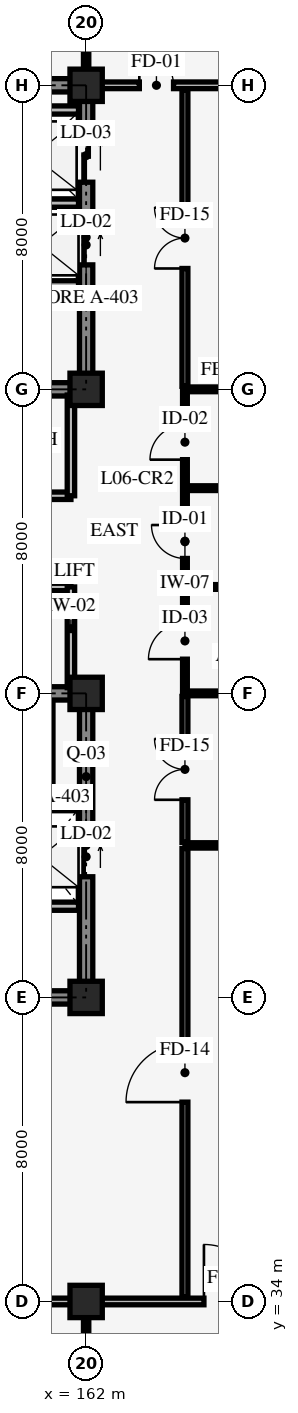
"""IFC4 building model, lengths in metres.
Left out: names, types, materials, properties, quantities, classifications, styles, units other than length and angle.
Written with IfcOpenShell. Run it as: python <this file> out.ifc"""

import sys

from ifc_helpers import new_model, si_unit, direction, frame, frame_2d, origin, origin_2d, place, context, subcontext, project, spatial, rectangle, extrude, element, fill, save


model = new_model("IFC4")
c1 = context("Model", 3, precision=1e-05, world=origin(), true_north=direction((0.0, 1.0)))
c2 = subcontext(c1, "Body", "Model", "MODEL_VIEW")
j1 = project(units=[si_unit("LENGTHUNIT", "METRE"), si_unit("PLANEANGLEUNIT", "RADIAN")], contexts=[c1])
p1 = place(None, origin())
s1 = spatial("IfcSite", under=j1, at=p1, CompositionType="ELEMENT")
p2 = place(p1, origin())
s2 = spatial("IfcBuilding", under=s1, at=p2, CompositionType="ELEMENT")
p3 = place(p2, frame((0.0, 0.0, 23.4)))
s3 = spatial("IfcBuildingStorey", under=s2, at=p3, CompositionType="ELEMENT", Elevation=23.4)
p4 = place(p3, frame((154.0, 42.0, 0.0), z_axis=(0.0, 0.0, 1.0), x_axis=(1.0, 0.0, 0.0)))
e1 = element("IfcWall", 1, at=p4, inside=s3, PredefinedType="SHEAR", context=c2, shape_type="SweptSolid", body=[
    extrude(rectangle(XDim=8.0, YDim=0.35, at=frame_2d((4.0, 0.0))), origin(), (0.0, 0.0, 1.0), 3.95),
])
p5 = place(p3, frame((162.0, 42.0, 0.0), z_axis=(0.0, 0.0, 1.0), x_axis=(0.0, 1.0, 0.0)))
e2 = element("IfcWall", 2, at=p5, inside=s3, PredefinedType="SHEAR", context=c2, shape_type="SweptSolid", body=[
    extrude(rectangle(XDim=8.0, YDim=0.35, at=frame_2d((4.0, 0.0))), origin(), (0.0, 0.0, 1.0), 3.95),
])
p6 = place(p5, frame((3.175, 0.0, 0.0)))
e3 = element("IfcOpeningElement", 3, at=p6, cuts=e2, PredefinedType="OPENING", context=c2, shape_type="SweptSolid", body=[
    extrude(rectangle(XDim=1.05, YDim=2.2, at=frame_2d((0.525, 1.1))), frame((0.0, 0.185, 0.0), z_axis=(0.0, -1.0, 0.0), x_axis=(1.0, 0.0, 0.0)), (0.0, 0.0, 1.0), 0.37),
])
p7 = place(p3, frame((162.0, 50.0, 0.0), z_axis=(0.0, 0.0, 1.0), x_axis=(-1.0, 0.0, 0.0)))
e4 = element("IfcWall", 4, at=p7, inside=s3, PredefinedType="SHEAR", context=c2, shape_type="SweptSolid", body=[
    extrude(rectangle(XDim=8.0, YDim=0.35, at=frame_2d((4.0, 0.0))), origin(), (0.0, 0.0, 1.0), 3.95),
])
p8 = place(p7, frame((5.3, 0.0, 0.0)))
e5 = element("IfcOpeningElement", 5, at=p8, cuts=e4, PredefinedType="OPENING", context=c2, shape_type="SweptSolid", body=[
    extrude(rectangle(XDim=1.3, YDim=2.15, at=frame_2d((0.65, 1.075))), frame((0.0, 0.185, 0.0), z_axis=(0.0, -1.0, 0.0), x_axis=(1.0, 0.0, 0.0)), (0.0, 0.0, 1.0), 0.37),
])
p9 = place(p7, frame((1.45, 0.0, 0.0)))
e6 = element("IfcOpeningElement", 6, at=p9, cuts=e4, PredefinedType="OPENING", context=c2, shape_type="SweptSolid", body=[
    extrude(rectangle(XDim=1.1, YDim=2.2, at=frame_2d((0.55, 1.1))), frame((0.0, 0.185, 0.0), z_axis=(0.0, -1.0, 0.0), x_axis=(1.0, 0.0, 0.0)), (0.0, 0.0, 1.0), 0.37),
])
p10 = place(p3, frame((154.0, 58.0, 0.0), z_axis=(0.0, 0.0, 1.0), x_axis=(1.0, 0.0, 0.0)))
e7 = element("IfcWall", 7, at=p10, inside=s3, PredefinedType="SHEAR", context=c2, shape_type="SweptSolid", body=[
    extrude(rectangle(XDim=8.0, YDim=0.35, at=frame_2d((4.0, 0.0))), origin(), (0.0, 0.0, 1.0), 3.95),
])
p11 = place(p10, frame((1.4, 0.0, 0.0)))
e8 = element("IfcOpeningElement", 8, at=p11, cuts=e7, PredefinedType="OPENING", context=c2, shape_type="SweptSolid", body=[
    extrude(rectangle(XDim=1.3, YDim=2.15, at=frame_2d((0.65, 1.075))), frame((0.0, 0.185, 0.0), z_axis=(0.0, -1.0, 0.0), x_axis=(1.0, 0.0, 0.0)), (0.0, 0.0, 1.0), 0.37),
])
p12 = place(p10, frame((5.3, 0.0, 0.0)))
e9 = element("IfcOpeningElement", 9, at=p12, cuts=e7, PredefinedType="OPENING", context=c2, shape_type="SweptSolid", body=[
    extrude(rectangle(XDim=1.1, YDim=2.2, at=frame_2d((0.55, 1.1))), frame((0.0, 0.185, 0.0), z_axis=(0.0, -1.0, 0.0), x_axis=(1.0, 0.0, 0.0)), (0.0, 0.0, 1.0), 0.37),
])
p13 = place(p3, frame((162.0, 58.0, 0.0), z_axis=(0.0, 0.0, 1.0), x_axis=(0.0, 1.0, 0.0)))
e10 = element("IfcWall", 10, at=p13, inside=s3, PredefinedType="SHEAR", context=c2, shape_type="SweptSolid", body=[
    extrude(rectangle(XDim=8.0, YDim=0.35, at=frame_2d((4.0, 0.0))), origin(), (0.0, 0.0, 1.0), 3.95),
])
p14 = place(p13, frame((3.275, 0.0, 0.0)))
e11 = element("IfcOpeningElement", 11, at=p14, cuts=e10, PredefinedType="OPENING", context=c2, shape_type="SweptSolid", body=[
    extrude(rectangle(XDim=1.05, YDim=2.2, at=frame_2d((0.525, 1.1))), frame((0.0, 0.185, 0.0), z_axis=(0.0, -1.0, 0.0), x_axis=(1.0, 0.0, 0.0)), (0.0, 0.0, 1.0), 0.37),
])
p15 = place(p13, frame((5.45, 0.0, 0.0)))
e12 = element("IfcOpeningElement", 12, at=p15, cuts=e10, PredefinedType="OPENING", context=c2, shape_type="SweptSolid", body=[
    extrude(rectangle(XDim=1.4, YDim=2.3, at=frame_2d((0.7, 1.15))), frame((0.0, 0.185, 0.0), z_axis=(0.0, -1.0, 0.0), x_axis=(1.0, 0.0, 0.0)), (0.0, 0.0, 1.0), 0.37),
])
p16 = place(p3, frame((162.0, 66.0, 0.0), z_axis=(0.0, 0.0, 1.0), x_axis=(-1.0, 0.0, 0.0)))
e13 = element("IfcWall", 13, at=p16, inside=s3, PredefinedType="SHEAR", context=c2, shape_type="SweptSolid", body=[
    extrude(rectangle(XDim=8.0, YDim=0.35, at=frame_2d((4.0, 0.0))), origin(), (0.0, 0.0, 1.0), 3.95),
])
for number, where, z_axis, x_axis in (
    (14, (162.0, 34.0, 0.0), (0.0, 0.0, 1.0), (1.0, 0.0, 0.0)),
    (15, (162.0, 42.0, 0.0), (0.0, 0.0, 1.0), (1.0, 0.0, 0.0)),
    (16, (162.0, 50.0, 0.0), (0.0, 0.0, 1.0), (1.0, 0.0, 0.0)),
    (17, (162.0, 58.0, 0.0), (0.0, 0.0, 1.0), (1.0, 0.0, 0.0)),
    (18, (162.0, 66.0, 0.0), (0.0, 0.0, 1.0), (1.0, 0.0, 0.0)),
):
    element("IfcColumn", number, at=place(p3, frame(where, z_axis=z_axis, x_axis=x_axis)), inside=s3, PredefinedType="COLUMN", context=c2, shape_type="SweptSolid", body=[
        extrude(rectangle(XDim=0.85, YDim=0.85, at=origin_2d()), origin(), (0.0, 0.0, 1.0), 4.2),
    ])
p17 = place(p3, frame((158.45, 47.02, 0.0), z_axis=(0.0, 0.0, 1.0), x_axis=(1.0, 0.0, 0.0)))
e19 = element("IfcWall", 19, at=p17, inside=s3, PredefinedType="STANDARD", context=c2, shape_type="SweptSolid", body=[
    extrude(rectangle(XDim=3.35, YDim=0.215, at=frame_2d((1.675, 0.0))), origin(), (0.0, 0.0, 1.0), 3.9),
])
p18 = place(p3, frame((161.02, 47.02, 0.0), z_axis=(0.0, 0.0, 1.0), x_axis=(0.0, 1.0, 0.0)))
e20 = element("IfcWall", 20, at=p18, inside=s3, PredefinedType="STANDARD", context=c2, shape_type="SweptSolid", body=[
    extrude(rectangle(XDim=2.78, YDim=0.215, at=frame_2d((1.39, 0.0))), origin(), (0.0, 0.0, 1.0), 3.9),
])
p19 = place(p3, frame((159.78, 44.4, 0.0), z_axis=(0.0, 0.0, 1.0), x_axis=(1.0, 0.0, 0.0)))
e21 = element("IfcWall", 21, at=p19, inside=s3, PredefinedType="STANDARD", context=c2, shape_type="SweptSolid", body=[
    extrude(rectangle(XDim=2.02, YDim=0.215, at=frame_2d((1.01, 0.0))), origin(), (0.0, 0.0, 1.0), 3.9),
])
p20 = place(p3, frame((158.45, 62.9, 0.0), z_axis=(0.0, 0.0, 1.0), x_axis=(1.0, 0.0, 0.0)))
e22 = element("IfcWall", 22, at=p20, inside=s3, PredefinedType="STANDARD", context=c2, shape_type="SweptSolid", body=[
    extrude(rectangle(XDim=3.35, YDim=0.215, at=frame_2d((1.675, 0.0))), origin(), (0.0, 0.0, 1.0), 3.9),
])
p21 = place(p3, frame((159.38, 65.35, 0.0), z_axis=(0.0, 0.0, 1.0), x_axis=(1.0, 0.0, 0.0)))
e23 = element("IfcWall", 23, at=p21, inside=s3, PredefinedType="STANDARD", context=c2, shape_type="SweptSolid", body=[
    extrude(rectangle(XDim=2.42, YDim=0.215, at=frame_2d((1.21, 0.0))), origin(), (0.0, 0.0, 1.0), 3.9),
])
p22 = place(p3, frame((158.45, 60.75, 0.0), z_axis=(0.0, 0.0, 1.0), x_axis=(1.0, 0.0, 0.0)))
e24 = element("IfcWall", 24, at=p22, inside=s3, PredefinedType="STANDARD", context=c2, shape_type="SweptSolid", body=[
    extrude(rectangle(XDim=3.35, YDim=0.215, at=frame_2d((1.675, 0.0))), origin(), (0.0, 0.0, 1.0), 3.9),
])
p23 = place(p3, frame((154.0, 52.8, 0.0), z_axis=(0.0, 0.0, 1.0), x_axis=(1.0, 0.0, 0.0)))
e25 = element("IfcWall", 25, at=p23, inside=s3, PredefinedType="STANDARD", context=c2, shape_type="SweptSolid", body=[
    extrude(rectangle(XDim=7.6, YDim=0.195, at=frame_2d((3.8, 0.0))), origin(), (0.0, 0.0, 1.0), 3.9),
])
p24 = place(p23, frame((2.8, 0.0, 0.0)))
e26 = element("IfcOpeningElement", 26, at=p24, cuts=e25, PredefinedType="OPENING", context=c2, shape_type="SweptSolid", body=[
    extrude(rectangle(XDim=1.2, YDim=2.1, at=frame_2d((0.6, 1.05))), frame((0.0, 0.107, 0.0), z_axis=(0.0, -1.0, 0.0), x_axis=(1.0, 0.0, 0.0)), (0.0, 0.0, 1.0), 0.215),
])
p25 = place(p3, frame((161.6, 50.15, 0.0), z_axis=(0.0, 0.0, 1.0), x_axis=(0.0, 1.0, 0.0)))
e27 = element("IfcWall", 27, at=p25, inside=s3, PredefinedType="STANDARD", context=c2, shape_type="SweptSolid", body=[
    extrude(rectangle(XDim=2.65, YDim=0.195, at=frame_2d((1.325, 0.0))), origin(), (0.0, 0.0, 1.0), 3.19),
])
p26 = place(p3, frame((154.0, 55.2, 0.0), z_axis=(0.0, 0.0, 1.0), x_axis=(1.0, 0.0, 0.0)))
e28 = element("IfcWall", 28, at=p26, inside=s3, PredefinedType="STANDARD", context=c2, shape_type="SweptSolid", body=[
    extrude(rectangle(XDim=7.6, YDim=0.195, at=frame_2d((3.8, 0.0))), origin(), (0.0, 0.0, 1.0), 3.9),
])
p27 = place(p26, frame((2.8, 0.0, 0.0)))
e29 = element("IfcOpeningElement", 29, at=p27, cuts=e28, PredefinedType="OPENING", context=c2, shape_type="SweptSolid", body=[
    extrude(rectangle(XDim=1.3, YDim=2.15, at=frame_2d((0.65, 1.075))), frame((0.0, 0.107, 0.0), z_axis=(0.0, -1.0, 0.0), x_axis=(1.0, 0.0, 0.0)), (0.0, 0.0, 1.0), 0.215),
])
p28 = place(p3, frame((161.6, 55.2, 0.0), z_axis=(0.0, 0.0, 1.0), x_axis=(0.0, 1.0, 0.0)))
e30 = element("IfcWall", 30, at=p28, inside=s3, PredefinedType="STANDARD", context=c2, shape_type="SweptSolid", body=[
    extrude(rectangle(XDim=2.65, YDim=0.195, at=frame_2d((1.325, 0.0))), origin(), (0.0, 0.0, 1.0), 3.19),
])
p29 = place(p3, frame((164.6, 50.0, 0.0), z_axis=(0.0, 0.0, 1.0), x_axis=(0.0, 1.0, 0.0)))
e31 = element("IfcWall", 31, at=p29, inside=s3, PredefinedType="STANDARD", context=c2, shape_type="SweptSolid", body=[
    extrude(rectangle(XDim=8.0, YDim=0.125, at=frame_2d((4.0, 0.0))), origin(), (0.0, 0.0, 1.0), 3.9),
])
p30 = place(p29, frame((0.9, 0.0, 0.0)))
e32 = element("IfcOpeningElement", 32, at=p30, cuts=e31, PredefinedType="OPENING", context=c2, shape_type="SweptSolid", body=[
    extrude(rectangle(XDim=0.96, YDim=2.08, at=frame_2d((0.48, 1.04))), frame((0.0, 0.073, 0.0), z_axis=(0.0, -1.0, 0.0), x_axis=(1.0, 0.0, 0.0)), (0.0, 0.0, 1.0), 0.145),
])
p31 = place(p29, frame((3.55, 0.0, 0.0)))
e33 = element("IfcOpeningElement", 33, at=p31, cuts=e31, PredefinedType="OPENING", context=c2, shape_type="SweptSolid", body=[
    extrude(rectangle(XDim=0.88, YDim=2.05, at=frame_2d((0.44, 1.025))), frame((0.0, 0.073, 0.0), z_axis=(0.0, -1.0, 0.0), x_axis=(1.0, 0.0, 0.0)), (0.0, 0.0, 1.0), 0.145),
])
p32 = place(p29, frame((6.15, 0.0, 0.0)))
e34 = element("IfcOpeningElement", 34, at=p32, cuts=e31, PredefinedType="OPENING", context=c2, shape_type="SweptSolid", body=[
    extrude(rectangle(XDim=0.92, YDim=2.05, at=frame_2d((0.46, 1.025))), frame((0.0, 0.073, 0.0), z_axis=(0.0, -1.0, 0.0), x_axis=(1.0, 0.0, 0.0)), (0.0, 0.0, 1.0), 0.145),
])
p33 = place(p3, frame((164.6, 50.0, 0.0), z_axis=(0.0, 0.0, 1.0), x_axis=(1.0, 0.0, 0.0)))
e35 = element("IfcWall", 35, at=p33, inside=s3, PredefinedType="STANDARD", context=c2, shape_type="SweptSolid", body=[
    extrude(rectangle(XDim=3.8, YDim=0.125, at=frame_2d((1.9, 0.0))), origin(), (0.0, 0.0, 1.0), 3.14),
])
for number, where, z_axis, x_axis in (
    (36, (164.6, 52.8, 0.0), (0.0, 0.0, 1.0), (1.0, 0.0, 0.0)),
    (37, (164.6, 55.4, 0.0), (0.0, 0.0, 1.0), (1.0, 0.0, 0.0)),
):
    element("IfcWall", number, at=place(p3, frame(where, z_axis=z_axis, x_axis=x_axis)), inside=s3, PredefinedType="STANDARD", context=c2, shape_type="SweptSolid", body=[
        extrude(rectangle(XDim=3.8, YDim=0.125, at=frame_2d((1.9, 0.0))), origin(), (0.0, 0.0, 1.0), 3.9),
    ])
p34 = place(p3, frame((164.6, 58.0, 0.0), z_axis=(0.0, 0.0, 1.0), x_axis=(1.0, 0.0, 0.0)))
e38 = element("IfcWall", 38, at=p34, inside=s3, PredefinedType="STANDARD", context=c2, shape_type="SweptSolid", body=[
    extrude(rectangle(XDim=3.8, YDim=0.125, at=frame_2d((1.9, 0.0))), origin(), (0.0, 0.0, 1.0), 3.14),
])
p35 = place(p3, frame((164.6, 34.12, 0.0), z_axis=(0.0, 0.0, 1.0), x_axis=(0.0, 1.0, 0.0)))
e39 = element("IfcWall", 39, at=p35, inside=s3, PredefinedType="STANDARD", context=c2, shape_type="SweptSolid", body=[
    extrude(rectangle(XDim=11.8, YDim=0.155, at=frame_2d((5.9, 0.0))), origin(), (0.0, 0.0, 1.0), 3.9),
])
p36 = place(p35, frame((5.125, 0.0, 0.0)))
e40 = element("IfcOpeningElement", 40, at=p36, cuts=e39, PredefinedType="OPENING", context=c2, shape_type="SweptSolid", body=[
    extrude(rectangle(XDim=1.55, YDim=2.25, at=frame_2d((0.775, 1.125))), frame((0.0, 0.087, 0.0), z_axis=(0.0, -1.0, 0.0), x_axis=(1.0, 0.0, 0.0)), (0.0, 0.0, 1.0), 0.175),
])
p37 = place(p3, frame((164.6, 46.0, 0.0), z_axis=(0.0, 0.0, 1.0), x_axis=(1.0, 0.0, 0.0)))
e41 = element("IfcWall", 41, at=p37, inside=s3, PredefinedType="STANDARD", context=c2, shape_type="SweptSolid", body=[
    extrude(rectangle(XDim=12.76, YDim=0.14, at=frame_2d((6.38, 0.0))), origin(), (0.0, 0.0, 1.0), 3.9),
])
p38 = place(p37, frame((5.72, 0.0, 0.0)))
e42 = element("IfcOpeningElement", 42, at=p38, cuts=e41, PredefinedType="OPENING", context=c2, shape_type="SweptSolid", body=[
    extrude(rectangle(XDim=1.32, YDim=2.16, at=frame_2d((0.66, 1.08))), frame((0.0, 0.08, 0.0), z_axis=(0.0, -1.0, 0.0), x_axis=(1.0, 0.0, 0.0)), (0.0, 0.0, 1.0), 0.16),
])
p39 = place(p3, frame((164.6, 46.08, 0.0), z_axis=(0.0, 0.0, 1.0), x_axis=(0.0, 1.0, 0.0)))
e43 = element("IfcWall", 43, at=p39, inside=s3, PredefinedType="STANDARD", context=c2, shape_type="SweptSolid", body=[
    extrude(rectangle(XDim=3.84, YDim=0.155, at=frame_2d((1.92, 0.0))), origin(), (0.0, 0.0, 1.0), 3.9),
])
p40 = place(p39, frame((1.12, 0.0, 0.0)))
e44 = element("IfcOpeningElement", 44, at=p40, cuts=e43, PredefinedType="OPENING", context=c2, shape_type="SweptSolid", body=[
    extrude(rectangle(XDim=1.6, YDim=2.25, at=frame_2d((0.8, 1.125))), frame((0.0, 0.087, 0.0), z_axis=(0.0, -1.0, 0.0), x_axis=(1.0, 0.0, 0.0)), (0.0, 0.0, 1.0), 0.175),
])
p41 = place(p3, frame((164.6, 58.08, 0.0), z_axis=(0.0, 0.0, 1.0), x_axis=(0.0, 1.0, 0.0)))
e45 = element("IfcWall", 45, at=p41, inside=s3, PredefinedType="STANDARD", context=c2, shape_type="SweptSolid", body=[
    extrude(rectangle(XDim=7.8, YDim=0.155, at=frame_2d((3.9, 0.0))), origin(), (0.0, 0.0, 1.0), 3.9),
])
p42 = place(p41, frame((3.1, 0.0, 0.0)))
e46 = element("IfcOpeningElement", 46, at=p42, cuts=e45, PredefinedType="OPENING", context=c2, shape_type="SweptSolid", body=[
    extrude(rectangle(XDim=1.6, YDim=2.25, at=frame_2d((0.8, 1.125))), frame((0.0, 0.087, 0.0), z_axis=(0.0, -1.0, 0.0), x_axis=(1.0, 0.0, 0.0)), (0.0, 0.0, 1.0), 0.175),
])
p43 = place(p3, frame((138.35, 34.0, 0.0), z_axis=(0.0, 0.0, 1.0), x_axis=(1.0, 0.0, 0.0)))
e47 = element("IfcWall", 47, at=p43, inside=s3, PredefinedType="STANDARD", context=c2, shape_type="SweptSolid", body=[
    extrude(rectangle(XDim=23.3, YDim=0.175, at=frame_2d((11.65, 0.0))), origin(), (0.0, 0.0, 1.0), 3.14),
])
p44 = place(p43, frame((3.3, 0.0, 0.0)))
e48 = element("IfcOpeningElement", 48, at=p44, cuts=e47, PredefinedType="OPENING", context=c2, shape_type="SweptSolid", body=[
    extrude(rectangle(XDim=1.45, YDim=2.2, at=frame_2d((0.725, 1.1))), frame((0.0, 0.098, 0.0), z_axis=(0.0, -1.0, 0.0), x_axis=(1.0, 0.0, 0.0)), (0.0, 0.0, 1.0), 0.195),
])
p45 = place(p3, frame((162.0, 26.05, 0.0), z_axis=(0.0, 0.0, 1.0), x_axis=(0.0, 1.0, 0.0)))
e49 = element("IfcWall", 49, at=p45, inside=s3, PredefinedType="STANDARD", context=c2, shape_type="SweptSolid", body=[
    extrude(rectangle(XDim=7.83, YDim=0.14, at=frame_2d((3.915, 0.0))), origin(), (0.0, 0.0, 1.0), 3.9),
])
p46 = place(p45, frame((3.0, 0.0, 0.0)))
e50 = element("IfcOpeningElement", 50, at=p46, cuts=e49, PredefinedType="OPENING", context=c2, shape_type="SweptSolid", body=[
    extrude(rectangle(XDim=1.06, YDim=2.12, at=frame_2d((0.53, 1.06))), frame((0.0, 0.08, 0.0), z_axis=(0.0, -1.0, 0.0), x_axis=(1.0, 0.0, 0.0)), (0.0, 0.0, 1.0), 0.16),
])
p47 = place(p3, frame((162.35, 34.0, 0.0), z_axis=(0.0, 0.0, 1.0), x_axis=(1.0, 0.0, 0.0)))
e51 = element("IfcWall", 51, at=p47, inside=s3, PredefinedType="STANDARD", context=c2, shape_type="SweptSolid", body=[
    extrude(rectangle(XDim=14.7, YDim=0.175, at=frame_2d((7.35, 0.0))), origin(), (0.0, 0.0, 1.0), 3.14),
])
p48 = place(p47, frame((2.75, 0.0, 0.0)))
e52 = element("IfcOpeningElement", 52, at=p48, cuts=e51, PredefinedType="OPENING", context=c2, shape_type="SweptSolid", body=[
    extrude(rectangle(XDim=1.5, YDim=2.2, at=frame_2d((0.75, 1.1))), frame((0.0, 0.098, 0.0), z_axis=(0.0, -1.0, 0.0), x_axis=(1.0, 0.0, 0.0)), (0.0, 0.0, 1.0), 0.195),
])
p49 = place(p3, frame((162.0, 66.12, 0.0), z_axis=(0.0, 0.0, 1.0), x_axis=(0.0, 1.0, 0.0)))
e53 = element("IfcWall", 53, at=p49, inside=s3, PredefinedType="STANDARD", context=c2, shape_type="SweptSolid", body=[
    extrude(rectangle(XDim=7.83, YDim=0.14, at=frame_2d((3.915, 0.0))), origin(), (0.0, 0.0, 1.0), 3.19),
])
p50 = place(p49, frame((3.0, 0.0, 0.0)))
e54 = element("IfcOpeningElement", 54, at=p50, cuts=e53, PredefinedType="OPENING", context=c2, shape_type="SweptSolid", body=[
    extrude(rectangle(XDim=1.12, YDim=2.12, at=frame_2d((0.56, 1.06))), frame((0.0, 0.08, 0.0), z_axis=(0.0, -1.0, 0.0), x_axis=(1.0, 0.0, 0.0)), (0.0, 0.0, 1.0), 0.16),
])
p51 = place(p3, frame((162.35, 66.0, 0.0), z_axis=(0.0, 0.0, 1.0), x_axis=(1.0, 0.0, 0.0)))
e55 = element("IfcWall", 55, at=p51, inside=s3, PredefinedType="STANDARD", context=c2, shape_type="SweptSolid", body=[
    extrude(rectangle(XDim=14.7, YDim=0.175, at=frame_2d((7.35, 0.0))), origin(), (0.0, 0.0, 1.0), 3.14),
])
p52 = place(p51, frame((1.05, 0.0, 0.0)))
e56 = element("IfcOpeningElement", 56, at=p52, cuts=e55, PredefinedType="OPENING", context=c2, shape_type="SweptSolid", body=[
    extrude(rectangle(XDim=0.9, YDim=2.1, at=frame_2d((0.45, 1.05))), frame((0.0, 0.098, 0.0), z_axis=(0.0, -1.0, 0.0), x_axis=(1.0, 0.0, 0.0)), (0.0, 0.0, 1.0), 0.195),
])
p53 = place(p6, origin())
e57 = element("IfcDoor", 57, at=p53, inside=s3, OperationType="SLIDING_TO_LEFT", PredefinedType="DOOR", context=c2, shape_type="SweptSolid", body=[
    extrude(rectangle(XDim=1.05, YDim=2.2, at=frame_2d((0.525, 1.1))), frame((0.0, 0.025, 0.0), z_axis=(0.0, -1.0, 0.0), x_axis=(1.0, 0.0, 0.0)), (0.0, 0.0, 1.0), 0.05),
])
fill(e3, e57)
p54 = place(p14, origin())
e58 = element("IfcDoor", 58, at=p54, inside=s3, OperationType="SLIDING_TO_RIGHT", PredefinedType="DOOR", context=c2, shape_type="SweptSolid", body=[
    extrude(rectangle(XDim=1.05, YDim=2.2, at=frame_2d((0.525, 1.1))), frame((0.0, 0.025, 0.0), z_axis=(0.0, -1.0, 0.0), x_axis=(1.0, 0.0, 0.0)), (0.0, 0.0, 1.0), 0.05),
])
fill(e11, e58)
p55 = place(p15, origin())
e59 = element("IfcDoor", 59, at=p55, inside=s3, OperationType="DOUBLE_DOOR_SLIDING", PredefinedType="DOOR", context=c2, shape_type="SweptSolid", body=[
    extrude(rectangle(XDim=1.4, YDim=2.3, at=frame_2d((0.7, 1.15))), frame((0.0, 0.025, 0.0), z_axis=(0.0, -1.0, 0.0), x_axis=(1.0, 0.0, 0.0)), (0.0, 0.0, 1.0), 0.05),
])
fill(e12, e59)
p56 = place(p30, origin())
e60 = element("IfcDoor", 60, at=p56, inside=s3, OperationType="SINGLE_SWING_LEFT", PredefinedType="DOOR", context=c2, shape_type="SweptSolid", body=[
    extrude(rectangle(XDim=0.96, YDim=2.08, at=frame_2d((0.48, 1.04))), frame((0.0, 0.025, 0.0), z_axis=(0.0, -1.0, 0.0), x_axis=(1.0, 0.0, 0.0)), (0.0, 0.0, 1.0), 0.05),
])
fill(e32, e60)
p57 = place(p31, origin())
e61 = element("IfcDoor", 61, at=p57, inside=s3, OperationType="SINGLE_SWING_RIGHT", PredefinedType="DOOR", context=c2, shape_type="SweptSolid", body=[
    extrude(rectangle(XDim=0.88, YDim=2.05, at=frame_2d((0.44, 1.025))), frame((0.0, 0.025, 0.0), z_axis=(0.0, -1.0, 0.0), x_axis=(1.0, 0.0, 0.0)), (0.0, 0.0, 1.0), 0.05),
])
fill(e33, e61)
p58 = place(p32, origin())
e62 = element("IfcDoor", 62, at=p58, inside=s3, OperationType="SINGLE_SWING_LEFT", PredefinedType="DOOR", context=c2, shape_type="SweptSolid", body=[
    extrude(rectangle(XDim=0.92, YDim=2.05, at=frame_2d((0.46, 1.025))), frame((0.0, 0.025, 0.0), z_axis=(0.0, -1.0, 0.0), x_axis=(1.0, 0.0, 0.0)), (0.0, 0.0, 1.0), 0.05),
])
fill(e34, e62)
p59 = place(p36, origin())
e63 = element("IfcDoor", 63, at=p59, inside=s3, OperationType="SINGLE_SWING_LEFT", PredefinedType="DOOR", context=c2, shape_type="SweptSolid", body=[
    extrude(rectangle(XDim=1.55, YDim=2.25, at=frame_2d((0.775, 1.125))), frame((0.0, 0.025, 0.0), z_axis=(0.0, -1.0, 0.0), x_axis=(1.0, 0.0, 0.0)), (0.0, 0.0, 1.0), 0.05),
])
fill(e40, e63)
p60 = place(p40, origin())
e64 = element("IfcDoor", 64, at=p60, inside=s3, OperationType="DOUBLE_DOOR_SINGLE_SWING", PredefinedType="DOOR", context=c2, shape_type="SweptSolid", body=[
    extrude(rectangle(XDim=1.6, YDim=2.25, at=frame_2d((0.8, 1.125))), frame((0.0, 0.025, 0.0), z_axis=(0.0, -1.0, 0.0), x_axis=(1.0, 0.0, 0.0)), (0.0, 0.0, 1.0), 0.05),
])
fill(e44, e64)
p61 = place(p42, origin())
e65 = element("IfcDoor", 65, at=p61, inside=s3, OperationType="DOUBLE_DOOR_SINGLE_SWING", PredefinedType="DOOR", context=c2, shape_type="SweptSolid", body=[
    extrude(rectangle(XDim=1.6, YDim=2.25, at=frame_2d((0.8, 1.125))), frame((0.0, 0.025, 0.0), z_axis=(0.0, -1.0, 0.0), x_axis=(1.0, 0.0, 0.0)), (0.0, 0.0, 1.0), 0.05),
])
fill(e46, e65)
p62 = place(p48, origin())
e66 = element("IfcDoor", 66, at=p62, inside=s3, OperationType="SINGLE_SWING_LEFT", PredefinedType="DOOR", context=c2, shape_type="SweptSolid", body=[
    extrude(rectangle(XDim=1.5, YDim=2.2, at=frame_2d((0.75, 1.1))), frame((0.0, 0.025, 0.0), z_axis=(0.0, -1.0, 0.0), x_axis=(1.0, 0.0, 0.0)), (0.0, 0.0, 1.0), 0.05),
])
fill(e52, e66)
p63 = place(p52, origin())
e67 = element("IfcDoor", 67, at=p63, inside=s3, OperationType="SINGLE_SWING_LEFT", PredefinedType="DOOR", context=c2, shape_type="SweptSolid", body=[
    extrude(rectangle(XDim=0.9, YDim=2.1, at=frame_2d((0.45, 1.05))), frame((0.0, 0.025, 0.0), z_axis=(0.0, -1.0, 0.0), x_axis=(1.0, 0.0, 0.0)), (0.0, 0.0, 1.0), 0.05),
])
fill(e56, e67)
save(model, sys.argv[1])
